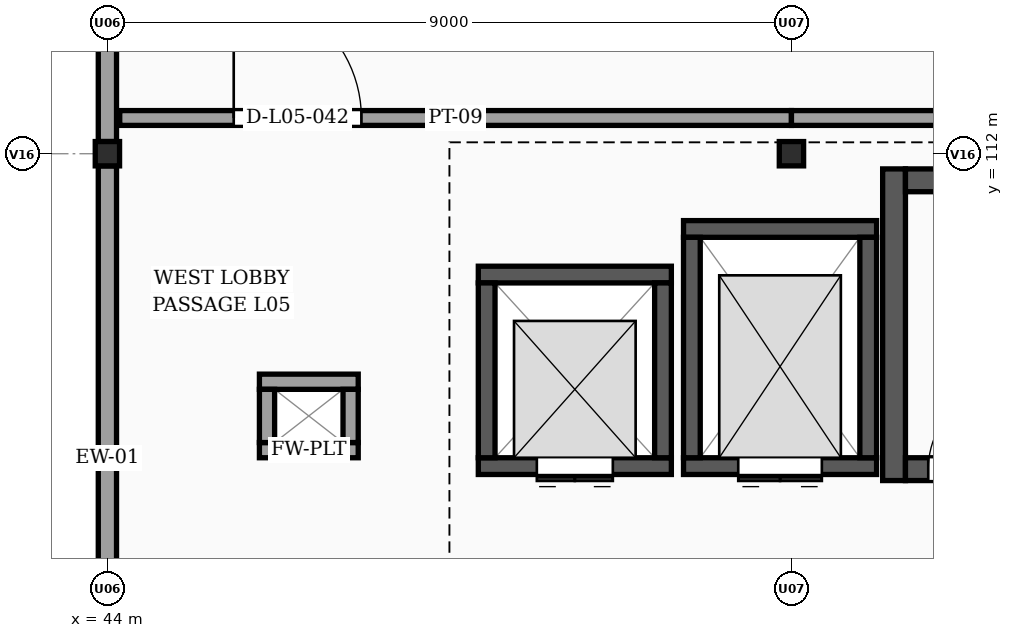
"""IFC4 building model, lengths in metres.
Left out: names, types, materials, properties, quantities, classifications, styles, units other than length and angle.
Written with IfcOpenShell. Run it as: python <this file> out.ifc"""

import sys

from ifc_helpers import new_model, si_unit, direction, frame, frame_2d, origin, origin_2d, place, context, subcontext, project, spatial, rectangle, extrude, element, fill, save


model = new_model("IFC4")
c1 = context("Model", 3, precision=1e-05, world=origin(), true_north=direction((0.0, 1.0)))
c2 = subcontext(c1, "Body", "Model", "MODEL_VIEW")
j1 = project(units=[si_unit("LENGTHUNIT", "METRE"), si_unit("PLANEANGLEUNIT", "RADIAN")], contexts=[c1])
p1 = place(None, origin())
s1 = spatial("IfcSite", under=j1, at=p1, CompositionType="ELEMENT")
p2 = place(p1, origin())
s2 = spatial("IfcBuilding", under=s1, at=p2, CompositionType="ELEMENT")
p3 = place(p2, frame((0.0, 0.0, 20.1)))
s3 = spatial("IfcBuildingStorey", under=s2, at=p3, CompositionType="ELEMENT", Elevation=20.1)
p4 = place(p3, frame((44.0, 112.0, 0.0), z_axis=(0.0, 0.0, 1.0), x_axis=(1.0, 0.0, 0.0)))
e1 = element("IfcColumn", 1, at=p4, inside=s3, PredefinedType="COLUMN", context=c2, shape_type="SweptSolid", body=[
    extrude(rectangle(XDim=0.32, YDim=0.32, at=origin_2d()), origin(), (0.0, 0.0, 1.0), 4.468),
])
p5 = place(p3, frame((53.0, 112.0, 0.0), z_axis=(0.0, 0.0, 1.0), x_axis=(1.0, 0.0, 0.0)))
e2 = element("IfcColumn", 2, at=p5, inside=s3, PredefinedType="COLUMN", context=c2, shape_type="SweptSolid", body=[
    extrude(rectangle(XDim=0.32, YDim=0.32, at=origin_2d()), origin(), (0.0, 0.0, 1.0), 4.146),
])
p6 = place(p3, frame((44.0, 104.16, 0.0), z_axis=(0.0, 0.0, 1.0), x_axis=(0.0, 1.0, 0.0)))
e3 = element("IfcWall", 3, at=p6, inside=s3, PredefinedType="SOLIDWALL", context=c2, shape_type="SweptSolid", body=[
    extrude(rectangle(XDim=7.68, YDim=0.24, at=frame_2d((3.84, 0.0))), origin(), (0.0, 0.0, 1.0), 3.74),
])
p7 = place(p3, frame((44.0, 112.16, 0.0), z_axis=(0.0, 0.0, 1.0), x_axis=(0.0, 1.0, 0.0)))
e4 = element("IfcWall", 4, at=p7, inside=s3, PredefinedType="SOLIDWALL", context=c2, shape_type="SweptSolid", body=[
    extrude(rectangle(XDim=7.68, YDim=0.24, at=frame_2d((3.84, 0.0))), origin(), (0.0, 0.0, 1.0), 4.085),
])
p8 = place(p7, frame((2.465, 0.0, 0.95)))
e5 = element("IfcOpeningElement", 5, at=p8, cuts=e4, PredefinedType="OPENING", context=c2, shape_type="SweptSolid", body=[
    extrude(rectangle(XDim=2.75, YDim=1.65, at=frame_2d((1.375, 0.825))), frame((0.0, 0.13, 0.0), z_axis=(0.0, -1.0, 0.0), x_axis=(1.0, 0.0, 0.0)), (0.0, 0.0, 1.0), 0.26),
])
p9 = place(p3, frame((54.35, 107.7, 0.0), z_axis=(0.0, 0.0, 1.0), x_axis=(0.0, 1.0, 0.0)))
e6 = element("IfcWall", 6, at=p9, inside=s3, PredefinedType="SHEAR", context=c2, shape_type="SweptSolid", body=[
    extrude(rectangle(XDim=4.1, YDim=0.3, at=frame_2d((2.05, 0.0))), origin(), (0.0, 0.0, 1.0), 3.653),
])
p10 = place(p3, frame((54.5, 107.85, 0.0), z_axis=(0.0, 0.0, 1.0), x_axis=(1.0, 0.0, 0.0)))
e7 = element("IfcWall", 7, at=p10, inside=s3, PredefinedType="SHEAR", context=c2, shape_type="SweptSolid", body=[
    extrude(rectangle(XDim=6.8, YDim=0.3, at=frame_2d((3.4, 0.0))), origin(), (0.0, 0.0, 1.0), 3.653),
])
p11 = place(p10, frame((0.3, 0.0, 0.0)))
e8 = element("IfcOpeningElement", 8, at=p11, cuts=e7, PredefinedType="OPENING", context=c2, shape_type="SweptSolid", body=[
    extrude(rectangle(XDim=1.1, YDim=2.15, at=frame_2d((0.55, 1.075))), frame((0.0, 0.16, 0.0), z_axis=(0.0, -1.0, 0.0), x_axis=(1.0, 0.0, 0.0)), (0.0, 0.0, 1.0), 0.32),
])
p12 = place(p3, frame((61.3, 111.65, 0.0), z_axis=(0.0, 0.0, 1.0), x_axis=(-1.0, 0.0, 0.0)))
e9 = element("IfcWall", 9, at=p12, inside=s3, PredefinedType="SHEAR", context=c2, shape_type="SweptSolid", body=[
    extrude(rectangle(XDim=6.8, YDim=0.3, at=frame_2d((3.4, 0.0))), origin(), (0.0, 0.0, 1.0), 3.653),
])
p13 = place(p3, frame((54.12, 107.89, 0.0), z_axis=(0.0, 0.0, 1.0), x_axis=(-1.0, 0.0, 0.0)))
e10 = element("IfcWall", 10, at=p13, inside=s3, PredefinedType="SHEAR", context=c2, shape_type="SweptSolid", body=[
    extrude(rectangle(XDim=2.54, YDim=0.22, at=frame_2d((1.27, 0.0))), origin(), (0.0, 0.0, 1.0), 4.591),
])
p14 = place(p13, frame((0.72, 0.0, 0.0)))
e11 = element("IfcOpeningElement", 11, at=p14, cuts=e10, PredefinedType="OPENING", context=c2, shape_type="SweptSolid", body=[
    extrude(rectangle(XDim=1.1, YDim=2.15, at=frame_2d((0.55, 1.075))), frame((0.0, 0.12, 0.0), z_axis=(0.0, -1.0, 0.0), x_axis=(1.0, 0.0, 0.0)), (0.0, 0.0, 1.0), 0.24),
])
p15 = place(p3, frame((51.58, 111.01, 0.0), z_axis=(0.0, 0.0, 1.0), x_axis=(1.0, 0.0, 0.0)))
e12 = element("IfcWall", 12, at=p15, inside=s3, PredefinedType="SHEAR", context=c2, shape_type="SweptSolid", body=[
    extrude(rectangle(XDim=2.54, YDim=0.22, at=frame_2d((1.27, 0.0))), origin(), (0.0, 0.0, 1.0), 4.591),
])
for number, where, z_axis, x_axis in (
    (13, (51.69, 108.0, 0.0), (0.0, 0.0, 1.0), (0.0, 1.0, 0.0)),
    (14, (54.01, 110.9, 0.0), (0.0, 0.0, 1.0), (0.0, -1.0, 0.0)),
):
    element("IfcWall", number, at=place(p3, frame(where, z_axis=z_axis, x_axis=x_axis)), inside=s3, PredefinedType="SHEAR", context=c2, shape_type="SweptSolid", body=[
        extrude(rectangle(XDim=2.9, YDim=0.22, at=frame_2d((1.45, 0.0))), origin(), (0.0, 0.0, 1.0), 4.591),
    ])
p16 = place(p3, frame((51.42, 107.89, 0.0), z_axis=(0.0, 0.0, 1.0), x_axis=(-1.0, 0.0, 0.0)))
e15 = element("IfcWall", 15, at=p16, inside=s3, PredefinedType="SHEAR", context=c2, shape_type="SweptSolid", body=[
    extrude(rectangle(XDim=2.54, YDim=0.22, at=frame_2d((1.27, 0.0))), origin(), (0.0, 0.0, 1.0), 4.675),
])
p17 = place(p16, frame((0.77, 0.0, 0.0)))
e16 = element("IfcOpeningElement", 16, at=p17, cuts=e15, PredefinedType="OPENING", context=c2, shape_type="SweptSolid", body=[
    extrude(rectangle(XDim=1.0, YDim=2.15, at=frame_2d((0.5, 1.075))), frame((0.0, 0.12, 0.0), z_axis=(0.0, -1.0, 0.0), x_axis=(1.0, 0.0, 0.0)), (0.0, 0.0, 1.0), 0.24),
])
p18 = place(p3, frame((48.88, 110.41, 0.0), z_axis=(0.0, 0.0, 1.0), x_axis=(1.0, 0.0, 0.0)))
e17 = element("IfcWall", 17, at=p18, inside=s3, PredefinedType="SHEAR", context=c2, shape_type="SweptSolid", body=[
    extrude(rectangle(XDim=2.54, YDim=0.22, at=frame_2d((1.27, 0.0))), origin(), (0.0, 0.0, 1.0), 4.675),
])
for number, where, z_axis, x_axis in (
    (18, (48.99, 108.0, 0.0), (0.0, 0.0, 1.0), (0.0, 1.0, 0.0)),
    (19, (51.31, 110.3, 0.0), (0.0, 0.0, 1.0), (0.0, -1.0, 0.0)),
):
    element("IfcWall", number, at=place(p3, frame(where, z_axis=z_axis, x_axis=x_axis)), inside=s3, PredefinedType="SHEAR", context=c2, shape_type="SweptSolid", body=[
        extrude(rectangle(XDim=2.3, YDim=0.22, at=frame_2d((1.15, 0.0))), origin(), (0.0, 0.0, 1.0), 4.675),
    ])
for number, where, z_axis, x_axis in (
    (20, (47.3, 108.1, 0.0), (0.0, 0.0, 1.0), (-1.0, 0.0, 0.0)),
    (21, (46.0, 109.0, 0.0), (0.0, 0.0, 1.0), (1.0, 0.0, 0.0)),
):
    element("IfcWall", number, at=place(p3, frame(where, z_axis=z_axis, x_axis=x_axis)), inside=s3, PredefinedType="PARTITIONING", context=c2, shape_type="SweptSolid", body=[
        extrude(rectangle(XDim=1.3, YDim=0.2, at=frame_2d((0.65, 0.0))), origin(), (0.0, 0.0, 1.0), 3.65),
    ])
for number, where, z_axis, x_axis in (
    (22, (46.1, 108.2, 0.0), (0.0, 0.0, 1.0), (0.0, 1.0, 0.0)),
    (23, (47.2, 108.9, 0.0), (0.0, 0.0, 1.0), (0.0, -1.0, 0.0)),
):
    element("IfcWall", number, at=place(p3, frame(where, z_axis=z_axis, x_axis=x_axis)), inside=s3, PredefinedType="PARTITIONING", context=c2, shape_type="SweptSolid", body=[
        extrude(rectangle(XDim=0.7, YDim=0.2, at=frame_2d((0.35, 0.0))), origin(), (0.0, 0.0, 1.0), 3.65),
    ])
p19 = place(p3, frame((44.162, 112.47, 0.0), z_axis=(0.0, 0.0, 1.0), x_axis=(1.0, 0.0, 0.0)))
e24 = element("IfcWall", 24, at=p19, inside=s3, PredefinedType="PARTITIONING", context=c2, shape_type="SweptSolid", body=[
    extrude(rectangle(XDim=8.838, YDim=0.195, at=frame_2d((4.419, 0.0))), origin(), (0.0, 0.0, 1.0), 3.65),
])
p20 = place(p19, frame((1.5, 0.0, 0.0)))
e25 = element("IfcOpeningElement", 25, at=p20, cuts=e24, PredefinedType="OPENING", context=c2, shape_type="SweptSolid", body=[
    extrude(rectangle(XDim=1.68, YDim=2.2, at=frame_2d((0.84, 1.1))), frame((0.0, 0.107, 0.0), z_axis=(0.0, -1.0, 0.0), x_axis=(1.0, 0.0, 0.0)), (0.0, 0.0, 1.0), 0.215),
])
p21 = place(p3, frame((53.0, 112.47, 0.0), z_axis=(0.0, 0.0, 1.0), x_axis=(1.0, 0.0, 0.0)))
e26 = element("IfcWall", 26, at=p21, inside=s3, PredefinedType="PARTITIONING", context=c2, shape_type="SweptSolid", body=[
    extrude(rectangle(XDim=8.73, YDim=0.195, at=frame_2d((4.365, 0.0))), origin(), (0.0, 0.0, 1.0), 3.65),
])
p22 = place(p11, origin())
e27 = element("IfcDoor", 27, at=p22, inside=s3, OperationType="SINGLE_SWING_RIGHT", PredefinedType="DOOR", context=c2, shape_type="SweptSolid", body=[
    extrude(rectangle(XDim=1.1, YDim=2.15, at=frame_2d((0.55, 1.075))), frame((0.0, 0.025, 0.0), z_axis=(0.0, -1.0, 0.0), x_axis=(1.0, 0.0, 0.0)), (0.0, 0.0, 1.0), 0.05),
])
fill(e8, e27)
p23 = place(p14, origin())
e28 = element("IfcDoor", 28, at=p23, inside=s3, OperationType="DOUBLE_DOOR_SLIDING", PredefinedType="DOOR", context=c2, shape_type="SweptSolid", body=[
    extrude(rectangle(XDim=1.1, YDim=2.15, at=frame_2d((0.55, 1.075))), frame((0.0, 0.025, 0.0), z_axis=(0.0, -1.0, 0.0), x_axis=(1.0, 0.0, 0.0)), (0.0, 0.0, 1.0), 0.05),
])
fill(e11, e28)
p24 = place(p17, origin())
e29 = element("IfcDoor", 29, at=p24, inside=s3, OperationType="DOUBLE_DOOR_SLIDING", PredefinedType="DOOR", context=c2, shape_type="SweptSolid", body=[
    extrude(rectangle(XDim=1.0, YDim=2.15, at=frame_2d((0.5, 1.075))), frame((0.0, 0.025, 0.0), z_axis=(0.0, -1.0, 0.0), x_axis=(1.0, 0.0, 0.0)), (0.0, 0.0, 1.0), 0.05),
])
fill(e16, e29)
p25 = place(p20, origin())
e30 = element("IfcDoor", 30, at=p25, inside=s3, OperationType="SINGLE_SWING_LEFT", PredefinedType="DOOR", context=c2, shape_type="SweptSolid", body=[
    extrude(rectangle(XDim=1.68, YDim=2.2, at=frame_2d((0.84, 1.1))), frame((0.0, 0.025, 0.0), z_axis=(0.0, -1.0, 0.0), x_axis=(1.0, 0.0, 0.0)), (0.0, 0.0, 1.0), 0.05),
])
fill(e25, e30)
save(model, sys.argv[1])
